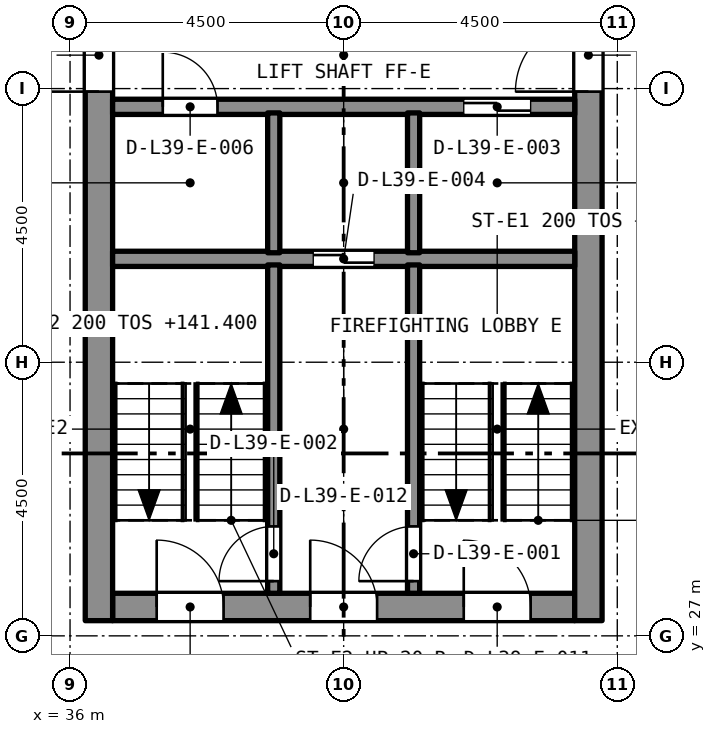
"""IFC4 building model, lengths in metres.
Left out: names, types, materials, properties, quantities, classifications, styles, units other than length and angle.
Written with IfcOpenShell. Run it as: python <this file> out.ifc"""

import sys

from ifc_helpers import new_model, si_unit, direction, frame, frame_2d, origin, place, context, subcontext, project, spatial, rectangle, extrude, element, fill, save


model = new_model("IFC4")
c1 = context("Model", 3, precision=1e-05, world=origin(), true_north=direction((0.0, 1.0)))
c2 = subcontext(c1, "Body", "Model", "MODEL_VIEW")
j1 = project(units=[si_unit("LENGTHUNIT", "METRE"), si_unit("PLANEANGLEUNIT", "RADIAN")], contexts=[c1])
p1 = place(None, origin())
s1 = spatial("IfcSite", under=j1, at=p1, CompositionType="ELEMENT")
p2 = place(p1, origin())
s2 = spatial("IfcBuilding", under=s1, at=p2, CompositionType="ELEMENT")
p3 = place(p2, frame((0.0, 0.0, 139.8)))
s3 = spatial("IfcBuildingStorey", under=s2, at=p3, CompositionType="ELEMENT", Elevation=139.8)
p4 = place(p3, frame((36.7, 27.475, 0.0), z_axis=(0.0, 0.0, 1.0), x_axis=(1.0, 0.0, 0.0)))
e1 = element("IfcWall", 1, at=p4, inside=s3, PredefinedType="SOLIDWALL", context=c2, shape_type="SweptSolid", body=[
    extrude(rectangle(XDim=7.6, YDim=0.45, at=frame_2d((3.8, 0.0))), origin(), (0.0, 0.0, 1.0), 3.2),
])
p5 = place(p4, frame((5.775, 0.0, 0.0)))
e2 = element("IfcOpeningElement", 2, at=p5, cuts=e1, PredefinedType="OPENING", context=c2, shape_type="SweptSolid", body=[
    extrude(rectangle(XDim=1.1, YDim=2.1, at=frame_2d((0.55, 1.05))), frame((0.0, 0.235, 0.0), z_axis=(0.0, -1.0, 0.0), x_axis=(1.0, 0.0, 0.0)), (0.0, 0.0, 1.0), 0.47),
])
p6 = place(p4, frame((3.25, 0.0, 0.0)))
e3 = element("IfcOpeningElement", 3, at=p6, cuts=e1, PredefinedType="OPENING", context=c2, shape_type="SweptSolid", body=[
    extrude(rectangle(XDim=1.1, YDim=2.1, at=frame_2d((0.55, 1.05))), frame((0.0, 0.235, 0.0), z_axis=(0.0, -1.0, 0.0), x_axis=(1.0, 0.0, 0.0)), (0.0, 0.0, 1.0), 0.47),
])
p7 = place(p4, frame((0.725, 0.0, 0.0)))
e4 = element("IfcOpeningElement", 4, at=p7, cuts=e1, PredefinedType="OPENING", context=c2, shape_type="SweptSolid", body=[
    extrude(rectangle(XDim=1.1, YDim=2.1, at=frame_2d((0.55, 1.05))), frame((0.0, 0.235, 0.0), z_axis=(0.0, -1.0, 0.0), x_axis=(1.0, 0.0, 0.0)), (0.0, 0.0, 1.0), 0.47),
])
p8 = place(p3, frame((36.475, 27.25, 0.0), z_axis=(0.0, 0.0, 1.0), x_axis=(0.0, 1.0, 0.0)))
e5 = element("IfcWall", 5, at=p8, inside=s3, PredefinedType="SOLIDWALL", context=c2, shape_type="SweptSolid", body=[
    extrude(rectangle(XDim=13.0, YDim=0.45, at=frame_2d((6.5, 0.0))), origin(), (0.0, 0.0, 1.0), 3.2),
])
p9 = place(p8, frame((8.7, 0.0, 0.0)))
e6 = element("IfcOpeningElement", 6, at=p9, cuts=e5, PredefinedType="OPENING", context=c2, shape_type="SweptSolid", body=[
    extrude(rectangle(XDim=1.2, YDim=2.1, at=frame_2d((0.6, 1.05))), frame((0.0, 0.235, 0.0), z_axis=(0.0, -1.0, 0.0), x_axis=(1.0, 0.0, 0.0)), (0.0, 0.0, 1.0), 0.47),
])
p10 = place(p3, frame((44.525, 27.25, 0.0), z_axis=(0.0, 0.0, 1.0), x_axis=(0.0, 1.0, 0.0)))
e7 = element("IfcWall", 7, at=p10, inside=s3, PredefinedType="SOLIDWALL", context=c2, shape_type="SweptSolid", body=[
    extrude(rectangle(XDim=13.0, YDim=0.45, at=frame_2d((6.5, 0.0))), origin(), (0.0, 0.0, 1.0), 3.2),
])
p11 = place(p10, frame((8.7, 0.0, 0.0)))
e8 = element("IfcOpeningElement", 8, at=p11, cuts=e7, PredefinedType="OPENING", context=c2, shape_type="SweptSolid", body=[
    extrude(rectangle(XDim=1.2, YDim=2.1, at=frame_2d((0.6, 1.05))), frame((0.0, 0.235, 0.0), z_axis=(0.0, -1.0, 0.0), x_axis=(1.0, 0.0, 0.0)), (0.0, 0.0, 1.0), 0.47),
])
p12 = place(p3, frame((36.7, 33.2, 0.0), z_axis=(0.0, 0.0, 1.0), x_axis=(1.0, 0.0, 0.0)))
e9 = element("IfcWall", 9, at=p12, inside=s3, PredefinedType="SOLIDWALL", context=c2, shape_type="SweptSolid", body=[
    extrude(rectangle(XDim=7.6, YDim=0.25, at=frame_2d((3.8, 0.0))), origin(), (0.0, 0.0, 1.0), 2.9),
])
p13 = place(p12, frame((3.3, 0.0, 0.0)))
e10 = element("IfcOpeningElement", 10, at=p13, cuts=e9, PredefinedType="OPENING", context=c2, shape_type="SweptSolid", body=[
    extrude(rectangle(XDim=1.0, YDim=2.1, at=frame_2d((0.5, 1.05))), frame((0.0, 0.135, 0.0), z_axis=(0.0, -1.0, 0.0), x_axis=(1.0, 0.0, 0.0)), (0.0, 0.0, 1.0), 0.27),
])
p14 = place(p3, frame((36.7, 35.7, 0.0), z_axis=(0.0, 0.0, 1.0), x_axis=(1.0, 0.0, 0.0)))
e11 = element("IfcWall", 11, at=p14, inside=s3, PredefinedType="SOLIDWALL", context=c2, shape_type="SweptSolid", body=[
    extrude(rectangle(XDim=7.6, YDim=0.25, at=frame_2d((3.8, 0.0))), origin(), (0.0, 0.0, 1.0), 2.9),
])
p15 = place(p14, frame((5.775, 0.0, 0.0)))
e12 = element("IfcOpeningElement", 12, at=p15, cuts=e11, PredefinedType="OPENING", context=c2, shape_type="SweptSolid", body=[
    extrude(rectangle(XDim=1.1, YDim=2.4, at=frame_2d((0.55, 1.2))), frame((0.0, 0.135, 0.0), z_axis=(0.0, -1.0, 0.0), x_axis=(1.0, 0.0, 0.0)), (0.0, 0.0, 1.0), 0.27),
])
p16 = place(p14, frame((0.825, 0.0, 0.0)))
e13 = element("IfcOpeningElement", 13, at=p16, cuts=e11, PredefinedType="OPENING", context=c2, shape_type="SweptSolid", body=[
    extrude(rectangle(XDim=0.9, YDim=2.1, at=frame_2d((0.45, 1.05))), frame((0.0, 0.135, 0.0), z_axis=(0.0, -1.0, 0.0), x_axis=(1.0, 0.0, 0.0)), (0.0, 0.0, 1.0), 0.27),
])
p17 = place(p3, frame((41.65, 27.7, 0.0), z_axis=(0.0, 0.0, 1.0), x_axis=(0.0, 1.0, 0.0)))
e14 = element("IfcWall", 14, at=p17, inside=s3, PredefinedType="SOLIDWALL", context=c2, shape_type="SweptSolid", body=[
    extrude(rectangle(XDim=5.4, YDim=0.2, at=frame_2d((2.7, 0.0))), origin(), (0.0, 0.0, 1.0), 2.9),
])
p18 = place(p17, frame((0.2, 0.0, 0.0)))
e15 = element("IfcOpeningElement", 15, at=p18, cuts=e14, PredefinedType="OPENING", context=c2, shape_type="SweptSolid", body=[
    extrude(rectangle(XDim=0.9, YDim=2.1, at=frame_2d((0.45, 1.05))), frame((0.0, 0.11, 0.0), z_axis=(0.0, -1.0, 0.0), x_axis=(1.0, 0.0, 0.0)), (0.0, 0.0, 1.0), 0.22),
])
p19 = place(p3, frame((39.35, 27.7, 0.0), z_axis=(0.0, 0.0, 1.0), x_axis=(0.0, 1.0, 0.0)))
e16 = element("IfcWall", 16, at=p19, inside=s3, PredefinedType="SOLIDWALL", context=c2, shape_type="SweptSolid", body=[
    extrude(rectangle(XDim=5.4, YDim=0.2, at=frame_2d((2.7, 0.0))), origin(), (0.0, 0.0, 1.0), 2.9),
])
p20 = place(p19, frame((0.2, 0.0, 0.0)))
e17 = element("IfcOpeningElement", 17, at=p20, cuts=e16, PredefinedType="OPENING", context=c2, shape_type="SweptSolid", body=[
    extrude(rectangle(XDim=0.9, YDim=2.1, at=frame_2d((0.45, 1.05))), frame((0.0, 0.11, 0.0), z_axis=(0.0, -1.0, 0.0), x_axis=(1.0, 0.0, 0.0)), (0.0, 0.0, 1.0), 0.22),
])
for number, where, z_axis, x_axis in (
    (18, (41.65, 33.3, 0.0), (0.0, 0.0, 1.0), (0.0, 1.0, 0.0)),
    (19, (39.35, 33.3, 0.0), (0.0, 0.0, 1.0), (0.0, 1.0, 0.0)),
):
    element("IfcWall", number, at=place(p3, frame(where, z_axis=z_axis, x_axis=x_axis)), inside=s3, PredefinedType="SOLIDWALL", context=c2, shape_type="SweptSolid", body=[
        extrude(rectangle(XDim=2.3, YDim=0.2, at=frame_2d((1.15, 0.0))), origin(), (0.0, 0.0, 1.0), 2.9),
    ])
p21 = place(p18, origin())
e20 = element("IfcDoor", 20, at=p21, inside=s3, OperationType="SINGLE_SWING_LEFT", PredefinedType="DOOR", context=c2, shape_type="SweptSolid", body=[
    extrude(rectangle(XDim=0.9, YDim=2.1, at=frame_2d((0.45, 1.05))), frame((0.0, 0.025, 0.0), z_axis=(0.0, -1.0, 0.0), x_axis=(1.0, 0.0, 0.0)), (0.0, 0.0, 1.0), 0.05),
])
fill(e15, e20)
p22 = place(p20, origin())
e21 = element("IfcDoor", 21, at=p22, inside=s3, OperationType="SINGLE_SWING_LEFT", PredefinedType="DOOR", context=c2, shape_type="SweptSolid", body=[
    extrude(rectangle(XDim=0.9, YDim=2.1, at=frame_2d((0.45, 1.05))), frame((0.0, 0.025, 0.0), z_axis=(0.0, -1.0, 0.0), x_axis=(1.0, 0.0, 0.0)), (0.0, 0.0, 1.0), 0.05),
])
fill(e17, e21)
p23 = place(p15, origin())
e22 = element("IfcDoor", 22, at=p23, inside=s3, OperationType="SLIDING_TO_LEFT", PredefinedType="DOOR", context=c2, shape_type="SweptSolid", body=[
    extrude(rectangle(XDim=1.1, YDim=2.4, at=frame_2d((0.55, 1.2))), frame((0.0, 0.025, 0.0), z_axis=(0.0, -1.0, 0.0), x_axis=(1.0, 0.0, 0.0)), (0.0, 0.0, 1.0), 0.05),
])
fill(e12, e22)
p24 = place(p13, origin())
e23 = element("IfcDoor", 23, at=p24, inside=s3, OperationType="SLIDING_TO_LEFT", PredefinedType="DOOR", context=c2, shape_type="SweptSolid", body=[
    extrude(rectangle(XDim=1.0, YDim=2.1, at=frame_2d((0.5, 1.05))), frame((0.0, 0.025, 0.0), z_axis=(0.0, -1.0, 0.0), x_axis=(1.0, 0.0, 0.0)), (0.0, 0.0, 1.0), 0.05),
])
fill(e10, e23)
p25 = place(p16, origin())
e24 = element("IfcDoor", 24, at=p25, inside=s3, OperationType="SINGLE_SWING_LEFT", PredefinedType="DOOR", context=c2, shape_type="SweptSolid", body=[
    extrude(rectangle(XDim=0.9, YDim=2.1, at=frame_2d((0.45, 1.05))), frame((0.0, 0.025, 0.0), z_axis=(0.0, -1.0, 0.0), x_axis=(1.0, 0.0, 0.0)), (0.0, 0.0, 1.0), 0.05),
])
fill(e13, e24)
p26 = place(p5, origin())
e25 = element("IfcDoor", 25, at=p26, inside=s3, OperationType="SINGLE_SWING_LEFT", PredefinedType="DOOR", context=c2, shape_type="SweptSolid", body=[
    extrude(rectangle(XDim=1.1, YDim=2.1, at=frame_2d((0.55, 1.05))), frame((0.0, 0.025, 0.0), z_axis=(0.0, -1.0, 0.0), x_axis=(1.0, 0.0, 0.0)), (0.0, 0.0, 1.0), 0.05),
])
fill(e2, e25)
p27 = place(p6, origin())
e26 = element("IfcDoor", 26, at=p27, inside=s3, OperationType="SINGLE_SWING_LEFT", PredefinedType="DOOR", context=c2, shape_type="SweptSolid", body=[
    extrude(rectangle(XDim=1.1, YDim=2.1, at=frame_2d((0.55, 1.05))), frame((0.0, 0.025, 0.0), z_axis=(0.0, -1.0, 0.0), x_axis=(1.0, 0.0, 0.0)), (0.0, 0.0, 1.0), 0.05),
])
fill(e3, e26)
p28 = place(p7, origin())
e27 = element("IfcDoor", 27, at=p28, inside=s3, OperationType="SINGLE_SWING_LEFT", PredefinedType="DOOR", context=c2, shape_type="SweptSolid", body=[
    extrude(rectangle(XDim=1.1, YDim=2.1, at=frame_2d((0.55, 1.05))), frame((0.0, 0.025, 0.0), z_axis=(0.0, -1.0, 0.0), x_axis=(1.0, 0.0, 0.0)), (0.0, 0.0, 1.0), 0.05),
])
fill(e4, e27)
p29 = place(p9, origin())
e28 = element("IfcDoor", 28, at=p29, inside=s3, OperationType="SINGLE_SWING_LEFT", PredefinedType="DOOR", context=c2, shape_type="SweptSolid", body=[
    extrude(rectangle(XDim=1.2, YDim=2.1, at=frame_2d((0.6, 1.05))), frame((0.0, 0.025, 0.0), z_axis=(0.0, -1.0, 0.0), x_axis=(1.0, 0.0, 0.0)), (0.0, 0.0, 1.0), 0.05),
])
fill(e6, e28)
p30 = place(p11, origin())
e29 = element("IfcDoor", 29, at=p30, inside=s3, OperationType="SINGLE_SWING_LEFT", PredefinedType="DOOR", context=c2, shape_type="SweptSolid", body=[
    extrude(rectangle(XDim=1.2, YDim=2.1, at=frame_2d((0.6, 1.05))), frame((0.0, 0.025, 0.0), z_axis=(0.0, -1.0, 0.0), x_axis=(1.0, 0.0, 0.0)), (0.0, 0.0, 1.0), 0.05),
])
fill(e8, e29)
save(model, sys.argv[1])
